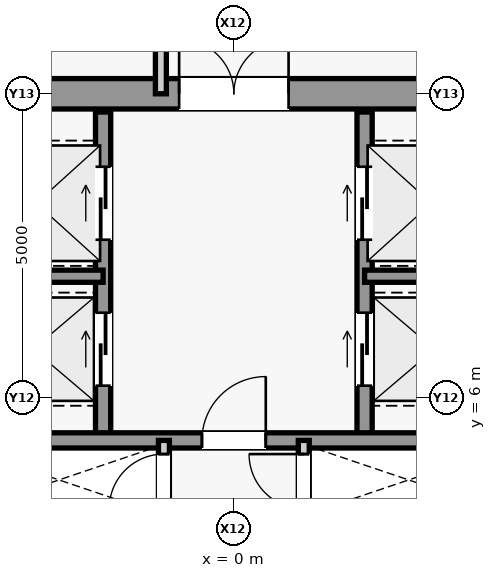
"""IFC4 building model, lengths in metres.
Left out: names, types, materials, properties, quantities, classifications, styles, units other than length and angle.
Written with IfcOpenShell. Run it as: python <this file> out.ifc"""

import sys

from ifc_helpers import new_model, si_unit, direction, frame, frame_2d, origin, place, context, subcontext, project, spatial, rectangle, extrude, source, transform, mapped, element, fill, save


model = new_model("IFC4")
c1 = context("Model", 3, precision=1e-05, world=origin(), true_north=direction((0.0, 1.0)))
c2 = subcontext(c1, "Body", "Model", "MODEL_VIEW")
j1 = project(units=[si_unit("LENGTHUNIT", "METRE"), si_unit("PLANEANGLEUNIT", "RADIAN")], contexts=[c1])
p1 = place(None, origin())
s1 = spatial("IfcSite", under=j1, at=p1, CompositionType="ELEMENT")
p2 = place(p1, origin())
s2 = spatial("IfcBuilding", under=s1, at=p2, CompositionType="ELEMENT")
p3 = place(p2, frame((0.0, 0.0, 203.1)))
s3 = spatial("IfcBuildingStorey", under=s2, at=p3, CompositionType="ELEMENT", Elevation=203.1)
m1 = source(origin(), c2, "Body", "SweptSolid", [
    extrude(rectangle(XDim=9.2, YDim=0.5, at=frame_2d((4.6, 0.0))), origin(), (0.0, 0.0, 1.0), 3.78),
])
p4 = place(p3, frame((-4.6, 11.0, 0.0), z_axis=(0.0, 0.0, 1.0), x_axis=(1.0, 0.0, 0.0)))
e1 = element("IfcWall", 1, at=p4, inside=s3, PredefinedType="SHEAR", context=c2, shape_type="MappedRepresentation", body=[
    mapped(m1, transform((0.0, 0.0, 0.0), scale=1.0)),
])
m2 = source(origin(), c2, "Body", "SweptSolid", [
    extrude(rectangle(XDim=1.8, YDim=2.25, at=frame_2d((0.9, 1.125))), frame((0.0, 0.26, 0.0), z_axis=(0.0, -1.0, 0.0), x_axis=(1.0, 0.0, 0.0)), (0.0, 0.0, 1.0), 0.52),
])
p5 = place(p4, frame((3.7, 0.0, 0.0)))
e2 = element("IfcOpeningElement", 2, at=p5, cuts=e1, PredefinedType="OPENING", context=c2, shape_type="MappedRepresentation", body=[
    mapped(m2, transform((0.0, 0.0, 0.0), scale=1.0)),
])
m3 = source(origin(), c2, "Body", "SweptSolid", [
    extrude(rectangle(XDim=5.4, YDim=0.25, at=frame_2d((2.7, 0.0))), origin(), (0.0, 0.0, 1.0), 3.78),
])
p6 = place(p3, frame((-2.15, 5.3, 0.0), z_axis=(0.0, 0.0, 1.0), x_axis=(0.0, 1.0, 0.0)))
e3 = element("IfcWall", 3, at=p6, inside=s3, PredefinedType="SHEAR", context=c2, shape_type="MappedRepresentation", body=[
    mapped(m3, transform((0.0, 0.0, 0.0), scale=1.0)),
])
m4 = source(origin(), c2, "Body", "SweptSolid", [
    extrude(rectangle(XDim=1.2, YDim=2.3, at=frame_2d((0.6, 1.15))), frame((0.0, 0.135, 0.0), z_axis=(0.0, -1.0, 0.0), x_axis=(1.0, 0.0, 0.0)), (0.0, 0.0, 1.0), 0.27),
])
p7 = place(p6, frame((3.3, 0.0, 0.0)))
e4 = element("IfcOpeningElement", 4, at=p7, cuts=e3, PredefinedType="OPENING", context=c2, shape_type="MappedRepresentation", body=[
    mapped(m4, transform((0.0, 0.0, 0.0), scale=1.0)),
])
p8 = place(p6, frame((0.9, 0.0, 0.0)))
e5 = element("IfcOpeningElement", 5, at=p8, cuts=e3, PredefinedType="OPENING", context=c2, shape_type="MappedRepresentation", body=[
    mapped(m4, transform((0.0, 0.0, 0.0), scale=1.0)),
])
p9 = place(p3, frame((2.15, 5.3, 0.0), z_axis=(0.0, 0.0, 1.0), x_axis=(0.0, 1.0, 0.0)))
e6 = element("IfcWall", 6, at=p9, inside=s3, PredefinedType="SHEAR", context=c2, shape_type="MappedRepresentation", body=[
    mapped(m3, transform((0.0, 0.0, 0.0), scale=1.0)),
])
p10 = place(p9, frame((3.3, 0.0, 0.0)))
e7 = element("IfcOpeningElement", 7, at=p10, cuts=e6, PredefinedType="OPENING", context=c2, shape_type="MappedRepresentation", body=[
    mapped(m4, transform((0.0, 0.0, 0.0), scale=1.0)),
])
p11 = place(p9, frame((0.9, 0.0, 0.0)))
e8 = element("IfcOpeningElement", 8, at=p11, cuts=e6, PredefinedType="OPENING", context=c2, shape_type="MappedRepresentation", body=[
    mapped(m4, transform((0.0, 0.0, 0.0), scale=1.0)),
])
m5 = source(origin(), c2, "Body", "SweptSolid", [
    extrude(rectangle(XDim=2.45, YDim=0.2, at=frame_2d((1.225, 0.0))), origin(), (0.0, 0.0, 1.0), 3.78),
])
for number, where, z_axis, x_axis in (
    (9, (-4.6, 8.0, 0.0), (0.0, 0.0, 1.0), (1.0, 0.0, 0.0)),
    (10, (2.15, 8.0, 0.0), (0.0, 0.0, 1.0), (1.0, 0.0, 0.0)),
):
    element("IfcWall", number, at=place(p3, frame(where, z_axis=z_axis, x_axis=x_axis)), inside=s3, PredefinedType="SHEAR", context=c2, shape_type="MappedRepresentation", body=[
        mapped(m5, transform((0.0, 0.0, 0.0), scale=1.0)),
    ])
m6 = source(origin(), c2, "Body", "SweptSolid", [
    extrude(rectangle(XDim=9.2, YDim=0.25, at=frame_2d((4.6, 0.0))), origin(), (0.0, 0.0, 1.0), 3.78),
])
p12 = place(p3, frame((-4.6, 5.3, 0.0), z_axis=(0.0, 0.0, 1.0), x_axis=(1.0, 0.0, 0.0)))
e11 = element("IfcWall", 11, at=p12, inside=s3, PredefinedType="SHEAR", context=c2, shape_type="MappedRepresentation", body=[
    mapped(m6, transform((0.0, 0.0, 0.0), scale=1.0)),
])
m7 = source(origin(), c2, "Body", "SweptSolid", [
    extrude(rectangle(XDim=1.05, YDim=2.2, at=frame_2d((0.525, 1.1))), frame((0.0, 0.135, 0.0), z_axis=(0.0, -1.0, 0.0), x_axis=(1.0, 0.0, 0.0)), (0.0, 0.0, 1.0), 0.27),
])
p13 = place(p12, frame((4.075, 0.0, 0.0)))
e12 = element("IfcOpeningElement", 12, at=p13, cuts=e11, PredefinedType="OPENING", context=c2, shape_type="MappedRepresentation", body=[
    mapped(m7, transform((0.0, 0.0, 0.0), scale=1.0)),
])
m8 = source(origin(), c2, "Body", "SweptSolid", [
    extrude(rectangle(XDim=10.6, YDim=0.18, at=frame_2d((5.3, 0.0))), origin(), (0.0, 0.0, 1.0), 3.78),
])
p14 = place(p3, frame((-1.15, -5.3, 0.0), z_axis=(0.0, 0.0, 1.0), x_axis=(0.0, 1.0, 0.0)))
e13 = element("IfcWall", 13, at=p14, inside=s3, PredefinedType="PARTITIONING", context=c2, shape_type="MappedRepresentation", body=[
    mapped(m8, transform((0.0, 0.0, 0.0), scale=1.0)),
])
m9 = source(origin(), c2, "Body", "SweptSolid", [
    extrude(rectangle(XDim=0.9, YDim=2.15, at=frame_2d((0.45, 1.075))), frame((0.0, 0.1, 0.0), z_axis=(0.0, -1.0, 0.0), x_axis=(1.0, 0.0, 0.0)), (0.0, 0.0, 1.0), 0.2),
])
p15 = place(p14, frame((1.9, 0.0, 0.0)))
e14 = element("IfcOpeningElement", 14, at=p15, cuts=e13, PredefinedType="OPENING", context=c2, shape_type="MappedRepresentation", body=[
    mapped(m9, transform((0.0, 0.0, 0.0), scale=1.0)),
])
p16 = place(p14, frame((6.55, 0.0, 0.0)))
e15 = element("IfcOpeningElement", 15, at=p16, cuts=e13, PredefinedType="OPENING", context=c2, shape_type="MappedRepresentation", body=[
    mapped(m9, transform((0.0, 0.0, 0.0), scale=1.0)),
])
p17 = place(p14, frame((9.475, 0.0, 0.0)))
e16 = element("IfcOpeningElement", 16, at=p17, cuts=e13, PredefinedType="OPENING", context=c2, shape_type="MappedRepresentation", body=[
    mapped(m9, transform((0.0, 0.0, 0.0), scale=1.0)),
])
p18 = place(p3, frame((1.15, -5.3, 0.0), z_axis=(0.0, 0.0, 1.0), x_axis=(0.0, 1.0, 0.0)))
e17 = element("IfcWall", 17, at=p18, inside=s3, PredefinedType="PARTITIONING", context=c2, shape_type="MappedRepresentation", body=[
    mapped(m8, transform((0.0, 0.0, 0.0), scale=1.0)),
])
p19 = place(p18, frame((0.85, 0.0, 0.0)))
e18 = element("IfcOpeningElement", 18, at=p19, cuts=e17, PredefinedType="OPENING", context=c2, shape_type="MappedRepresentation", body=[
    mapped(m9, transform((0.0, 0.0, 0.0), scale=1.0)),
])
p20 = place(p18, frame((3.55, 0.0, 0.0)))
e19 = element("IfcOpeningElement", 19, at=p20, cuts=e17, PredefinedType="OPENING", context=c2, shape_type="MappedRepresentation", body=[
    mapped(m9, transform((0.0, 0.0, 0.0), scale=1.0)),
])
p21 = place(p18, frame((6.3, 0.0, 0.0)))
e20 = element("IfcOpeningElement", 20, at=p21, cuts=e17, PredefinedType="OPENING", context=c2, shape_type="MappedRepresentation", body=[
    mapped(m9, transform((0.0, 0.0, 0.0), scale=1.0)),
])
p22 = place(p18, frame((8.25, 0.0, 0.0)))
e21 = element("IfcOpeningElement", 21, at=p22, cuts=e17, PredefinedType="OPENING", context=c2, shape_type="MappedRepresentation", body=[
    mapped(m9, transform((0.0, 0.0, 0.0), scale=1.0)),
])
p23 = place(p18, frame((9.475, 0.0, 0.0)))
e22 = element("IfcOpeningElement", 22, at=p23, cuts=e17, PredefinedType="OPENING", context=c2, shape_type="MappedRepresentation", body=[
    mapped(m9, transform((0.0, 0.0, 0.0), scale=1.0)),
])
m10 = source(origin(), c2, "Body", "SweptSolid", [
    extrude(rectangle(XDim=3.1, YDim=0.18, at=frame_2d((1.55, 0.0))), origin(), (0.0, 0.0, 1.0), 3.78),
])
p24 = place(p3, frame((-1.2, 11.0, 0.0), z_axis=(0.0, 0.0, 1.0), x_axis=(0.0, 1.0, 0.0)))
e23 = element("IfcWall", 23, at=p24, inside=s3, PredefinedType="PARTITIONING", context=c2, shape_type="MappedRepresentation", body=[
    mapped(m10, transform((0.0, 0.0, 0.0), scale=1.0)),
])
m11 = source(origin(), c2, "Body", "SweptSolid", [
    extrude(rectangle(XDim=1.05, YDim=2.2, at=frame_2d((0.525, 1.1))), frame((0.0, 0.025, 0.0), z_axis=(0.0, -1.0, 0.0), x_axis=(1.0, 0.0, 0.0)), (0.0, 0.0, 1.0), 0.05),
])
p25 = place(p13, origin())
e24 = element("IfcDoor", 24, at=p25, inside=s3, OperationType="SINGLE_SWING_RIGHT", PredefinedType="DOOR", context=c2, shape_type="MappedRepresentation", body=[
    mapped(m11, transform((0.0, 0.0, 0.0), scale=1.0)),
])
fill(e12, e24)
m12 = source(origin(), c2, "Body", "SweptSolid", [
    extrude(rectangle(XDim=1.8, YDim=2.25, at=frame_2d((0.9, 1.125))), frame((0.0, 0.025, 0.0), z_axis=(0.0, -1.0, 0.0), x_axis=(1.0, 0.0, 0.0)), (0.0, 0.0, 1.0), 0.05),
])
p26 = place(p5, origin())
e25 = element("IfcDoor", 25, at=p26, inside=s3, OperationType="SINGLE_SWING_RIGHT", PredefinedType="DOOR", context=c2, shape_type="MappedRepresentation", body=[
    mapped(m12, transform((0.0, 0.0, 0.0), scale=1.0)),
])
fill(e2, e25)
m13 = source(origin(), c2, "Body", "SweptSolid", [
    extrude(rectangle(XDim=0.9, YDim=2.15, at=frame_2d((0.45, 1.075))), frame((0.0, 0.025, 0.0), z_axis=(0.0, -1.0, 0.0), x_axis=(1.0, 0.0, 0.0)), (0.0, 0.0, 1.0), 0.05),
])
p27 = place(p17, origin())
e26 = element("IfcDoor", 26, at=p27, inside=s3, OperationType="SINGLE_SWING_LEFT", PredefinedType="DOOR", context=c2, shape_type="MappedRepresentation", body=[
    mapped(m13, transform((0.0, 0.0, 0.0), scale=1.0)),
])
fill(e16, e26)
p28 = place(p23, origin())
e27 = element("IfcDoor", 27, at=p28, inside=s3, OperationType="SINGLE_SWING_RIGHT", PredefinedType="DOOR", context=c2, shape_type="MappedRepresentation", body=[
    mapped(m13, transform((0.0, 0.0, 0.0), scale=1.0)),
])
fill(e22, e27)
m14 = source(origin(), c2, "Body", "SweptSolid", [
    extrude(rectangle(XDim=1.2, YDim=2.3, at=frame_2d((0.6, 1.15))), frame((0.0, 0.025, 0.0), z_axis=(0.0, -1.0, 0.0), x_axis=(1.0, 0.0, 0.0)), (0.0, 0.0, 1.0), 0.05),
])
p29 = place(p7, origin())
e28 = element("IfcDoor", 28, at=p29, inside=s3, OperationType="SLIDING_TO_LEFT", PredefinedType="DOOR", context=c2, shape_type="MappedRepresentation", body=[
    mapped(m14, transform((0.0, 0.0, 0.0), scale=1.0)),
])
fill(e4, e28)
p30 = place(p10, origin())
e29 = element("IfcDoor", 29, at=p30, inside=s3, OperationType="SLIDING_TO_LEFT", PredefinedType="DOOR", context=c2, shape_type="MappedRepresentation", body=[
    mapped(m14, transform((0.0, 0.0, 0.0), scale=1.0)),
])
fill(e7, e29)
p31 = place(p8, origin())
e30 = element("IfcDoor", 30, at=p31, inside=s3, OperationType="SLIDING_TO_LEFT", PredefinedType="DOOR", context=c2, shape_type="MappedRepresentation", body=[
    mapped(m14, transform((0.0, 0.0, 0.0), scale=1.0)),
])
fill(e5, e30)
p32 = place(p11, origin())
e31 = element("IfcDoor", 31, at=p32, inside=s3, OperationType="SLIDING_TO_LEFT", PredefinedType="DOOR", context=c2, shape_type="MappedRepresentation", body=[
    mapped(m14, transform((0.0, 0.0, 0.0), scale=1.0)),
])
fill(e8, e31)
save(model, sys.argv[1])
